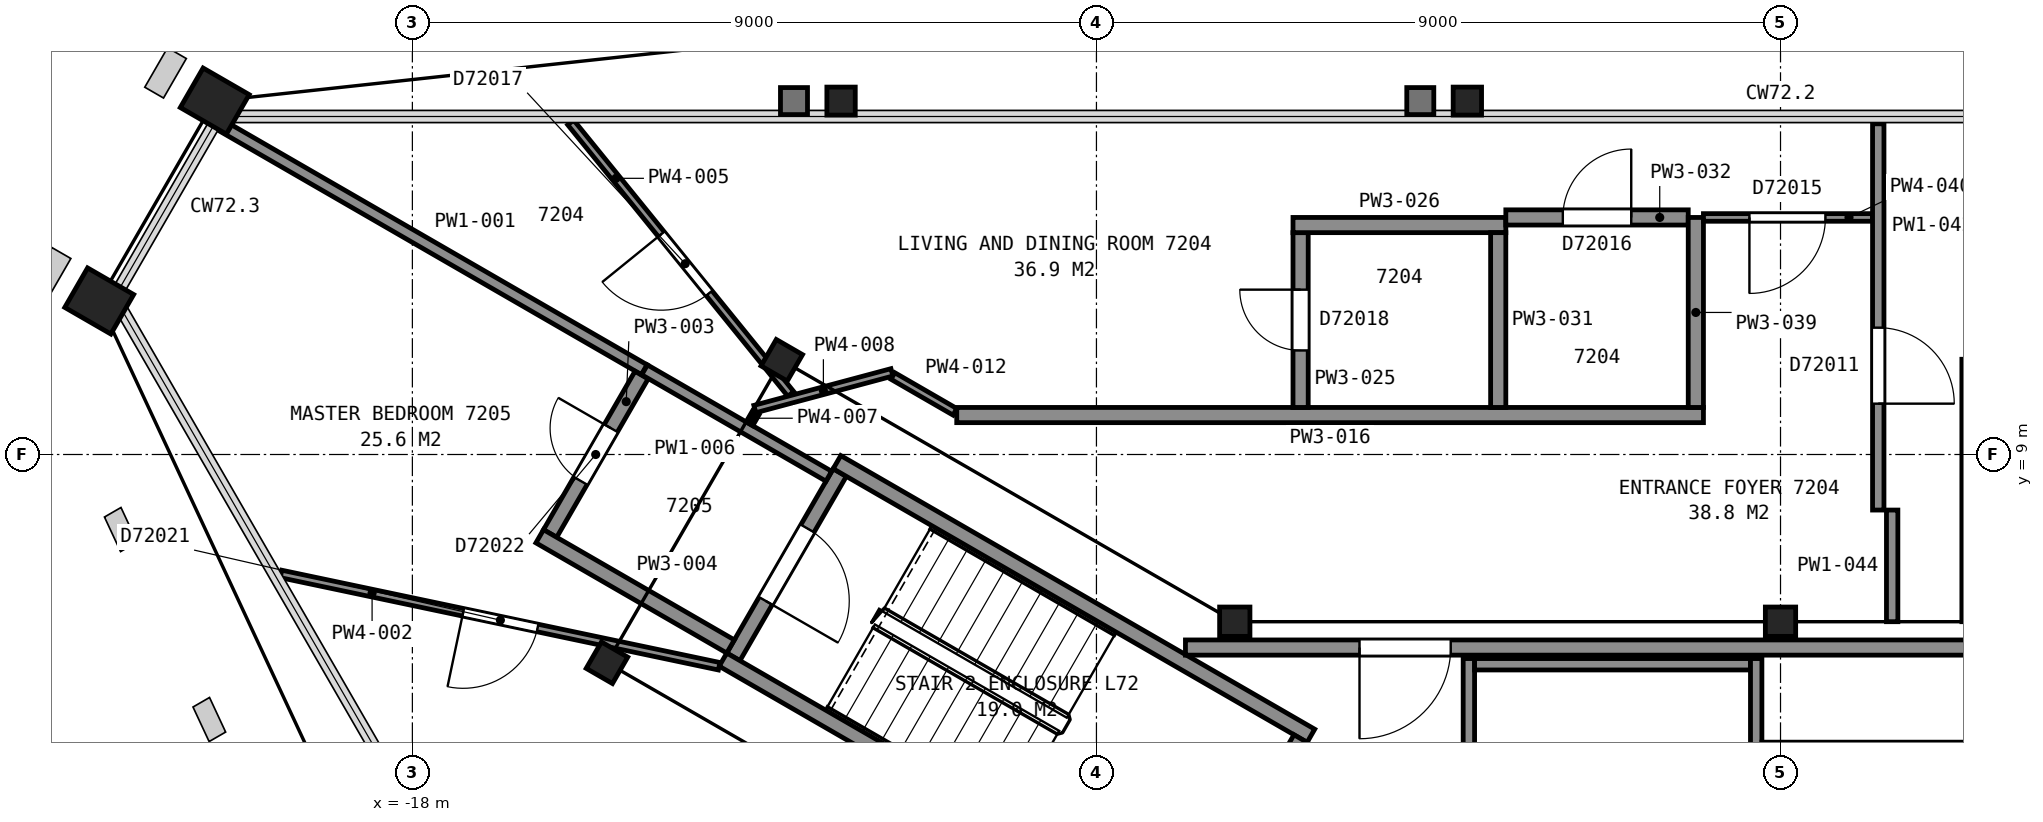
"""IFC4 building model, lengths in metres.
Left out: names, types, materials, properties, quantities, classifications, styles, units other than length and angle.
Written with IfcOpenShell. Run it as: python <this file> out.ifc"""

import sys

from ifc_helpers import new_model, si_unit, direction, frame, frame_2d, origin, origin_2d, place, context, subcontext, project, spatial, rectangle, hollow_rectangle, i_section, extrude, element, fill, save


model = new_model("IFC4")
c1 = context("Model", 3, precision=1e-05, world=origin(), true_north=direction((0.0, 1.0)))
c2 = subcontext(c1, "Body", "Model", "MODEL_VIEW")
j1 = project(units=[si_unit("LENGTHUNIT", "METRE"), si_unit("PLANEANGLEUNIT", "RADIAN")], contexts=[c1])
p1 = place(None, origin())
s1 = spatial("IfcSite", under=j1, at=p1, CompositionType="ELEMENT")
p2 = place(p1, origin())
s2 = spatial("IfcBuilding", under=s1, at=p2, CompositionType="ELEMENT")
p3 = place(p2, frame((0.0, 0.0, 286.2)))
s3 = spatial("IfcBuildingStorey", under=s2, at=p3, CompositionType="ELEMENT", Elevation=286.2)
for number, where, z_axis, x_axis in (
    (1, (-4.12, 13.65, 0.0), (0.0, 0.0, 1.0), (1.0, 0.0, 0.0)),
    (2, (-12.36, 13.65, 0.0), (0.0, 0.0, 1.0), (1.0, 0.0, 0.0)),
):
    element("IfcColumn", number, at=place(p3, frame(where, z_axis=z_axis, x_axis=x_axis)), inside=s3, PredefinedType="COLUMN", context=c2, shape_type="SweptSolid", body=[
        extrude(i_section(OverallWidth=0.373, OverallDepth=0.368, WebThickness=0.015, FlangeThickness=0.024, FilletRadius=0.015, at=origin_2d()), origin(), (0.0, 0.0, 1.0), 3.7),
    ])
for number, where, z_axis, x_axis in (
    (3, (-20.6, 13.65, 0.0), (0.0, 0.0, 1.0), (0.5, 0.866, 0.0)),
    (4, (-22.12, 11.02, 0.0), (0.0, 0.0, 1.0), (0.5, 0.866, 0.0)),
):
    element("IfcColumn", number, at=place(p3, frame(where, z_axis=z_axis, x_axis=x_axis)), inside=s3, PredefinedType="COLUMN", context=c2, shape_type="SweptSolid", body=[
        extrude(hollow_rectangle(XDim=0.6, YDim=0.7, WallThickness=0.04, at=origin_2d()), origin(), (0.0, 0.0, 1.0), 3.7),
    ])
for number, where, z_axis, x_axis in (
    (5, (0.0, 6.8, 0.0), (0.0, 0.0, 1.0), (1.0, 0.0, 0.0)),
    (6, (-7.18, 6.8, 0.0), (0.0, 0.0, 1.0), (1.0, 0.0, 0.0)),
):
    element("IfcColumn", number, at=place(p3, frame(where, z_axis=z_axis, x_axis=x_axis)), inside=s3, PredefinedType="COLUMN", context=c2, shape_type="SweptSolid", body=[
        extrude(i_section(OverallWidth=0.399, OverallDepth=0.386, WebThickness=0.021, FlangeThickness=0.033, FilletRadius=0.015, at=origin_2d()), origin(), (0.0, 0.0, 1.0), 3.7),
    ])
for number, where, z_axis, x_axis in (
    (7, (-13.14, 10.24, 0.0), (0.0, 0.0, 1.0), (0.5, 0.866, 0.0)),
    (8, (-15.44, 6.26, 0.0), (0.0, 0.0, 1.0), (0.5, 0.866, 0.0)),
):
    element("IfcColumn", number, at=place(p3, frame(where, z_axis=z_axis, x_axis=x_axis)), inside=s3, PredefinedType="COLUMN", context=c2, shape_type="SweptSolid", body=[
        extrude(i_section(OverallWidth=0.401, OverallDepth=0.399, WebThickness=0.025, FlangeThickness=0.04, FilletRadius=0.015, at=origin_2d()), origin(), (0.0, 0.0, 1.0), 3.7),
    ])
p4 = place(p3, frame((-12.377, 8.762, 0.0), z_axis=(0.0, 0.0, 1.0), x_axis=(-0.500049511043, -0.865996816683, 0.0)))
e9 = element("IfcWall", 9, at=p4, inside=s3, PredefinedType="PARTITIONING", context=c2, shape_type="SweptSolid", body=[
    extrude(rectangle(XDim=2.8, YDim=0.2, at=frame_2d((1.4, 0.0))), origin(), (0.0, 0.0, 1.0), 3.45),
])
p5 = place(p4, frame((0.85, 0.0, 0.0)))
e10 = element("IfcOpeningElement", 10, at=p5, cuts=e9, PredefinedType="OPENING", context=c2, shape_type="SweptSolid", body=[
    extrude(rectangle(XDim=1.1, YDim=2.1, at=frame_2d((0.55, 1.05))), frame((0.0, 0.11, 0.0), z_axis=(0.0, -1.0, 0.0), x_axis=(1.0, 0.0, 0.0)), (0.0, 0.0, 1.0), 0.22),
])
for number, where, z_axis, x_axis in (
    (11, (-7.678, 2.701, 0.0), (0.0, 0.0, 1.0), (-0.866, 0.5, 0.0)),
    (12, (-6.178, 5.299, 0.0), (0.0, 0.0, 1.0), (-0.866, 0.5, 0.0)),
):
    element("IfcWall", number, at=place(p3, frame(where, z_axis=z_axis, x_axis=x_axis)), inside=s3, PredefinedType="PARTITIONING", context=c2, shape_type="SweptSolid", body=[
        extrude(rectangle(XDim=7.2, YDim=0.2, at=frame_2d((3.6, 0.0))), origin(), (0.0, 0.0, 1.0), 3.45),
    ])
p6 = place(p3, frame((-6.315, 5.262, 0.0), z_axis=(0.0, 0.0, 1.0), x_axis=(-0.500049511043, -0.865996816683, 0.0)))
e13 = element("IfcWall", 13, at=p6, inside=s3, PredefinedType="PARTITIONING", context=c2, shape_type="SweptSolid", body=[
    extrude(rectangle(XDim=2.8, YDim=0.2, at=frame_2d((1.4, 0.0))), origin(), (0.0, 0.0, 1.0), 3.45),
])
p7 = place(p3, frame((7.829, 6.46, 0.0), z_axis=(0.0, 0.0, 1.0), x_axis=(-1.0, 0.0, 0.0)))
e14 = element("IfcWall", 14, at=p7, inside=s3, PredefinedType="PARTITIONING", context=c2, shape_type="SweptSolid", body=[
    extrude(rectangle(XDim=15.658, YDim=0.2, at=frame_2d((7.829, 0.0))), origin(), (0.0, 0.0, 1.0), 3.45),
])
p8 = place(p7, frame((12.168, 0.0, 0.0)))
e15 = element("IfcOpeningElement", 15, at=p8, cuts=e14, PredefinedType="OPENING", context=c2, shape_type="SweptSolid", body=[
    extrude(rectangle(XDim=1.2, YDim=2.1, at=frame_2d((0.6, 1.05))), frame((0.0, 0.11, 0.0), z_axis=(0.0, -1.0, 0.0), x_axis=(1.0, 0.0, 0.0)), (0.0, 0.0, 1.0), 0.22),
])
p9 = place(p3, frame((-4.1, 2.085, 0.0), z_axis=(0.0, 0.0, 1.0), x_axis=(0.0, 1.0, 0.0)))
e16 = element("IfcWall", 16, at=p9, inside=s3, PredefinedType="PARTITIONING", context=c2, shape_type="SweptSolid", body=[
    extrude(rectangle(XDim=4.23, YDim=0.15, at=frame_2d((2.115, 0.0))), origin(), (0.0, 0.0, 1.0), 3.45),
])
p10 = place(p9, frame((1.625, 0.0, 0.0)))
e17 = element("IfcOpeningElement", 17, at=p10, cuts=e16, PredefinedType="OPENING", context=c2, shape_type="SweptSolid", body=[
    extrude(rectangle(XDim=1.0, YDim=2.1, at=frame_2d((0.5, 1.05))), frame((0.0, 0.085, 0.0), z_axis=(0.0, -1.0, 0.0), x_axis=(1.0, 0.0, 0.0)), (0.0, 0.0, 1.0), 0.17),
])
p11 = place(p3, frame((-4.025, 6.24, 0.0), z_axis=(0.0, 0.0, 1.0), x_axis=(1.0, 0.0, 0.0)))
e18 = element("IfcWall", 18, at=p11, inside=s3, PredefinedType="PARTITIONING", context=c2, shape_type="SweptSolid", body=[
    extrude(rectangle(XDim=3.63, YDim=0.15, at=frame_2d((1.815, 0.0))), origin(), (0.0, 0.0, 1.0), 3.45),
])
p12 = place(p3, frame((-0.32, 2.252, 0.0), z_axis=(0.0, 0.0, 1.0), x_axis=(0.0, 1.0, 0.0)))
e19 = element("IfcWall", 19, at=p12, inside=s3, PredefinedType="PARTITIONING", context=c2, shape_type="SweptSolid", body=[
    extrude(rectangle(XDim=4.063, YDim=0.15, at=frame_2d((2.031, 0.0))), origin(), (0.0, 0.0, 1.0), 3.45),
])
p13 = place(p3, frame((-0.245, 5.14, 0.0), z_axis=(0.0, 0.0, 1.0), x_axis=(1.0, 0.0, 0.0)))
e20 = element("IfcWall", 20, at=p13, inside=s3, PredefinedType="PARTITIONING", context=c2, shape_type="SweptSolid", body=[
    extrude(rectangle(XDim=5.11, YDim=0.15, at=frame_2d((2.555, 0.0))), origin(), (0.0, 0.0, 1.0), 3.45),
])
p14 = place(p13, frame((1.975, 0.0, 0.0)))
e21 = element("IfcOpeningElement", 21, at=p14, cuts=e20, PredefinedType="OPENING", context=c2, shape_type="SweptSolid", body=[
    extrude(rectangle(XDim=1.0, YDim=2.1, at=frame_2d((0.5, 1.05))), frame((0.0, 0.085, 0.0), z_axis=(0.0, -1.0, 0.0), x_axis=(1.0, 0.0, 0.0)), (0.0, 0.0, 1.0), 0.17),
])
p15 = place(p3, frame((-20.506, 13.324, 0.0), z_axis=(0.0, 0.0, 1.0), x_axis=(0.866004971522, -0.500035388047, 0.0)))
e22 = element("IfcWall", 22, at=p15, inside=s3, PredefinedType="PARTITIONING", context=c2, shape_type="SweptSolid", body=[
    extrude(rectangle(XDim=6.416, YDim=0.15, at=frame_2d((3.208, 0.0))), origin(), (0.0, 0.0, 1.0), 2.723),
])
p16 = place(p3, frame((-19.729, 7.428, 0.0), z_axis=(0.0, 0.0, 1.0), x_axis=(0.97852427483, -0.206131617102, 0.0)))
e23 = element("IfcWall", 23, at=p16, inside=s3, PredefinedType="PARTITIONING", context=c2, shape_type="SweptSolid", body=[
    extrude(rectangle(XDim=5.891, YDim=0.1, at=frame_2d((2.946, 0.0))), origin(), (0.0, 0.0, 1.0), 2.723),
])
p17 = place(p16, frame((2.45, 0.0, 0.0)))
e24 = element("IfcOpeningElement", 24, at=p17, cuts=e23, PredefinedType="OPENING", context=c2, shape_type="SweptSolid", body=[
    extrude(rectangle(XDim=1.0, YDim=2.1, at=frame_2d((0.5, 1.05))), frame((0.0, 0.06, 0.0), z_axis=(0.0, -1.0, 0.0), x_axis=(1.0, 0.0, 0.0)), (0.0, 0.0, 1.0), 0.12),
])
p18 = place(p3, frame((-14.985, 10.045, 0.0), z_axis=(0.0, 0.0, 1.0), x_axis=(-0.499903970786, -0.866080839178, 0.0)))
e25 = element("IfcWall", 25, at=p18, inside=s3, PredefinedType="PARTITIONING", context=c2, shape_type="SweptSolid", body=[
    extrude(rectangle(XDim=2.406, YDim=0.2, at=frame_2d((1.203, 0.0))), origin(), (0.0, 0.0, 1.0), 2.723),
])
p19 = place(p18, frame((0.806, 0.0, 0.0)))
e26 = element("IfcOpeningElement", 26, at=p19, cuts=e25, PredefinedType="OPENING", context=c2, shape_type="SweptSolid", body=[
    extrude(rectangle(XDim=0.8, YDim=2.1, at=frame_2d((0.4, 1.05))), frame((0.0, 0.11, 0.0), z_axis=(0.0, -1.0, 0.0), x_axis=(1.0, 0.0, 0.0)), (0.0, 0.0, 1.0), 0.22),
])
p20 = place(p3, frame((-16.325, 7.924, 0.0), z_axis=(0.0, 0.0, 1.0), x_axis=(0.865969617579, -0.500096612097, 0.0)))
e27 = element("IfcWall", 27, at=p20, inside=s3, PredefinedType="PARTITIONING", context=c2, shape_type="SweptSolid", body=[
    extrude(rectangle(XDim=2.899, YDim=0.2, at=frame_2d((1.45, 0.0))), origin(), (0.0, 0.0, 1.0), 2.723),
])
p21 = place(p3, frame((-13.021, 9.797, 0.0), z_axis=(0.0, 0.0, 1.0), x_axis=(-0.629738754572, 0.776806990822, 0.0)))
e28 = element("IfcWall", 28, at=p21, inside=s3, PredefinedType="PARTITIONING", context=c2, shape_type="SweptSolid", body=[
    extrude(rectangle(XDim=4.598, YDim=0.1, at=frame_2d((2.299, 0.0))), origin(), (0.0, 0.0, 1.0), 2.723),
])
p22 = place(p21, frame((1.706, 0.0, 0.0)))
e29 = element("IfcOpeningElement", 29, at=p22, cuts=e28, PredefinedType="OPENING", context=c2, shape_type="SweptSolid", body=[
    extrude(rectangle(XDim=1.0, YDim=2.1, at=frame_2d((0.5, 1.05))), frame((0.0, 0.06, 0.0), z_axis=(0.0, -1.0, 0.0), x_axis=(1.0, 0.0, 0.0)), (0.0, 0.0, 1.0), 0.12),
])
p23 = place(p3, frame((-14.945, 10.114, 0.0), z_axis=(0.0, 0.0, 1.0), x_axis=(0.865969158485, -0.500097407065, 0.0)))
e30 = element("IfcWall", 30, at=p23, inside=s3, PredefinedType="PARTITIONING", context=c2, shape_type="SweptSolid", body=[
    extrude(rectangle(XDim=2.799, YDim=0.15, at=frame_2d((1.4, 0.0))), origin(), (0.0, 0.0, 1.0), 2.723),
])
p24 = place(p3, frame((-13.565, 9.404, 0.0), z_axis=(0.0, 0.0, 1.0), x_axis=(0.500181256421, 0.865920730047, 0.0)))
e31 = element("IfcWall", 31, at=p24, inside=s3, PredefinedType="PARTITIONING", context=c2, shape_type="SweptSolid", body=[
    extrude(rectangle(XDim=0.169, YDim=0.1, at=frame_2d((0.084, 0.0))), origin(), (0.0, 0.0, 1.0), 2.723),
])
p25 = place(p3, frame((-13.494, 9.598, 0.0), z_axis=(0.0, 0.0, 1.0), x_axis=(0.96601104623, 0.258500790254, 0.0)))
e32 = element("IfcWall", 32, at=p25, inside=s3, PredefinedType="PARTITIONING", context=c2, shape_type="SweptSolid", body=[
    extrude(rectangle(XDim=1.867, YDim=0.1, at=frame_2d((0.934, 0.0))), origin(), (0.0, 0.0, 1.0), 2.723),
])
p26 = place(p3, frame((-11.678, 10.033, 0.0), z_axis=(0.0, 0.0, 1.0), x_axis=(0.866116627388, -0.499841962787, 0.0)))
e33 = element("IfcWall", 33, at=p26, inside=s3, PredefinedType="PARTITIONING", context=c2, shape_type="SweptSolid", body=[
    extrude(rectangle(XDim=0.943, YDim=0.1, at=frame_2d((0.472, 0.0))), origin(), (0.0, 0.0, 1.0), 2.723),
])
p27 = place(p3, frame((-10.838, 9.519, 0.0), z_axis=(0.0, 0.0, 1.0), x_axis=(1.0, 0.0, 0.0)))
e34 = element("IfcWall", 34, at=p27, inside=s3, PredefinedType="PARTITIONING", context=c2, shape_type="SweptSolid", body=[
    extrude(rectangle(XDim=9.824, YDim=0.2, at=frame_2d((4.912, 0.0))), origin(), (0.0, 0.0, 1.0), 2.723),
])
p28 = place(p3, frame((-6.314, 11.919, 0.0), z_axis=(0.0, 0.0, 1.0), x_axis=(0.0, -1.0, 0.0)))
e35 = element("IfcWall", 35, at=p28, inside=s3, PredefinedType="PARTITIONING", context=c2, shape_type="SweptSolid", body=[
    extrude(rectangle(XDim=2.3, YDim=0.2, at=frame_2d((1.15, 0.0))), origin(), (0.0, 0.0, 1.0), 2.723),
])
p29 = place(p28, frame((0.75, 0.0, 0.0)))
e36 = element("IfcOpeningElement", 36, at=p29, cuts=e35, PredefinedType="OPENING", context=c2, shape_type="SweptSolid", body=[
    extrude(rectangle(XDim=0.8, YDim=2.1, at=frame_2d((0.4, 1.05))), frame((0.0, 0.11, 0.0), z_axis=(0.0, -1.0, 0.0), x_axis=(1.0, 0.0, 0.0)), (0.0, 0.0, 1.0), 0.22),
])
p30 = place(p3, frame((-6.414, 12.019, 0.0), z_axis=(0.0, 0.0, 1.0), x_axis=(1.0, 0.0, 0.0)))
e37 = element("IfcWall", 37, at=p30, inside=s3, PredefinedType="PARTITIONING", context=c2, shape_type="SweptSolid", body=[
    extrude(rectangle(XDim=2.8, YDim=0.2, at=frame_2d((1.4, 0.0))), origin(), (0.0, 0.0, 1.0), 2.723),
])
p31 = place(p3, frame((-3.714, 9.619, 0.0), z_axis=(0.0, 0.0, 1.0), x_axis=(0.0, 1.0, 0.0)))
e38 = element("IfcWall", 38, at=p31, inside=s3, PredefinedType="PARTITIONING", context=c2, shape_type="SweptSolid", body=[
    extrude(rectangle(XDim=2.3, YDim=0.2, at=frame_2d((1.15, 0.0))), origin(), (0.0, 0.0, 1.0), 2.723),
])
p32 = place(p3, frame((-1.214, 12.119, 0.0), z_axis=(0.0, 0.0, 1.0), x_axis=(-1.0, 0.0, 0.0)))
e39 = element("IfcWall", 39, at=p32, inside=s3, PredefinedType="PARTITIONING", context=c2, shape_type="SweptSolid", body=[
    extrude(rectangle(XDim=2.4, YDim=0.2, at=frame_2d((1.2, 0.0))), origin(), (0.0, 0.0, 1.0), 2.723),
])
p33 = place(p32, frame((0.75, 0.0, 0.0)))
e40 = element("IfcOpeningElement", 40, at=p33, cuts=e39, PredefinedType="OPENING", context=c2, shape_type="SweptSolid", body=[
    extrude(rectangle(XDim=0.9, YDim=2.1, at=frame_2d((0.45, 1.05))), frame((0.0, 0.11, 0.0), z_axis=(0.0, -1.0, 0.0), x_axis=(1.0, 0.0, 0.0)), (0.0, 0.0, 1.0), 0.22),
])
p34 = place(p3, frame((-1.114, 9.619, 0.0), z_axis=(0.0, 0.0, 1.0), x_axis=(0.0, 1.0, 0.0)))
e41 = element("IfcWall", 41, at=p34, inside=s3, PredefinedType="PARTITIONING", context=c2, shape_type="SweptSolid", body=[
    extrude(rectangle(XDim=2.5, YDim=0.2, at=frame_2d((1.25, 0.0))), origin(), (0.0, 0.0, 1.0), 2.723),
])
p35 = place(p3, frame((-1.014, 12.119, 0.0), z_axis=(0.0, 0.0, 1.0), x_axis=(1.0, 0.0, 0.0)))
e42 = element("IfcWall", 42, at=p35, inside=s3, PredefinedType="PARTITIONING", context=c2, shape_type="SweptSolid", body=[
    extrude(rectangle(XDim=2.225, YDim=0.1, at=frame_2d((1.112, 0.0))), origin(), (0.0, 0.0, 1.0), 2.723),
])
p36 = place(p35, frame((0.605, 0.0, 0.0)))
e43 = element("IfcOpeningElement", 43, at=p36, cuts=e42, PredefinedType="OPENING", context=c2, shape_type="SweptSolid", body=[
    extrude(rectangle(XDim=1.0, YDim=2.1, at=frame_2d((0.5, 1.05))), frame((0.0, 0.06, 0.0), z_axis=(0.0, -1.0, 0.0), x_axis=(1.0, 0.0, 0.0)), (0.0, 0.0, 1.0), 0.12),
])
p37 = place(p3, frame((1.286, 13.351, 0.0), z_axis=(0.0, 0.0, 1.0), x_axis=(0.0, -1.0, 0.0)))
e44 = element("IfcWall", 44, at=p37, inside=s3, PredefinedType="PARTITIONING", context=c2, shape_type="SweptSolid", body=[
    extrude(rectangle(XDim=5.082, YDim=0.15, at=frame_2d((2.541, 0.0))), origin(), (0.0, 0.0, 1.0), 2.723),
])
p38 = place(p37, frame((2.682, 0.0, 0.0)))
e45 = element("IfcOpeningElement", 45, at=p38, cuts=e44, PredefinedType="OPENING", context=c2, shape_type="SweptSolid", body=[
    extrude(rectangle(XDim=1.0, YDim=2.1, at=frame_2d((0.5, 1.05))), frame((0.0, 0.085, 0.0), z_axis=(0.0, -1.0, 0.0), x_axis=(1.0, 0.0, 0.0)), (0.0, 0.0, 1.0), 0.17),
])
p39 = place(p3, frame((1.469, 6.8, 0.0), z_axis=(0.0, 0.0, 1.0), x_axis=(0.0, 1.0, 0.0)))
e46 = element("IfcWall", 46, at=p39, inside=s3, PredefinedType="PARTITIONING", context=c2, shape_type="SweptSolid", body=[
    extrude(rectangle(XDim=1.469, YDim=0.15, at=frame_2d((0.734, 0.0))), origin(), (0.0, 0.0, 1.0), 2.723),
])
p40 = place(p3, frame((2.486, 6.8, 0.0), z_axis=(0.0, 0.0, 1.0), x_axis=(0.0, 1.0, 0.0)))
e47 = element("IfcWall", 47, at=p40, inside=s3, PredefinedType="PARTITIONING", context=c2, shape_type="SweptSolid", body=[
    extrude(rectangle(XDim=3.453, YDim=0.2, at=frame_2d((1.727, 0.0))), origin(), (0.0, 0.0, 1.0), 2.723),
])
p41 = place(p5, origin())
e48 = element("IfcDoor", 48, at=p41, inside=s3, OperationType="SINGLE_SWING_RIGHT", PredefinedType="DOOR", context=c2, shape_type="SweptSolid", body=[
    extrude(rectangle(XDim=1.1, YDim=2.1, at=frame_2d((0.55, 1.05))), frame((0.0, 0.025, 0.0), z_axis=(0.0, -1.0, 0.0), x_axis=(1.0, 0.0, 0.0)), (0.0, 0.0, 1.0), 0.05),
])
fill(e10, e48)
p42 = place(p8, origin())
e49 = element("IfcDoor", 49, at=p42, inside=s3, OperationType="SINGLE_SWING_RIGHT", PredefinedType="DOOR", context=c2, shape_type="SweptSolid", body=[
    extrude(rectangle(XDim=1.2, YDim=2.1, at=frame_2d((0.6, 1.05))), frame((0.0, 0.025, 0.0), z_axis=(0.0, -1.0, 0.0), x_axis=(1.0, 0.0, 0.0)), (0.0, 0.0, 1.0), 0.05),
])
fill(e15, e49)
p43 = place(p17, origin())
e50 = element("IfcDoor", 50, at=p43, inside=s3, OperationType="SINGLE_SWING_LEFT", PredefinedType="DOOR", context=c2, shape_type="SweptSolid", body=[
    extrude(rectangle(XDim=1.0, YDim=2.1, at=frame_2d((0.5, 1.05))), frame((0.0, 0.025, 0.0), z_axis=(0.0, -1.0, 0.0), x_axis=(1.0, 0.0, 0.0)), (0.0, 0.0, 1.0), 0.05),
])
fill(e24, e50)
p44 = place(p19, origin())
e51 = element("IfcDoor", 51, at=p44, inside=s3, OperationType="SINGLE_SWING_LEFT", PredefinedType="DOOR", context=c2, shape_type="SweptSolid", body=[
    extrude(rectangle(XDim=0.8, YDim=2.1, at=frame_2d((0.4, 1.05))), frame((0.0, 0.025, 0.0), z_axis=(0.0, -1.0, 0.0), x_axis=(1.0, 0.0, 0.0)), (0.0, 0.0, 1.0), 0.05),
])
fill(e26, e51)
p45 = place(p22, origin())
e52 = element("IfcDoor", 52, at=p45, inside=s3, OperationType="SINGLE_SWING_RIGHT", PredefinedType="DOOR", context=c2, shape_type="SweptSolid", body=[
    extrude(rectangle(XDim=1.0, YDim=2.1, at=frame_2d((0.5, 1.05))), frame((0.0, 0.025, 0.0), z_axis=(0.0, -1.0, 0.0), x_axis=(1.0, 0.0, 0.0)), (0.0, 0.0, 1.0), 0.05),
])
fill(e29, e52)
p46 = place(p29, origin())
e53 = element("IfcDoor", 53, at=p46, inside=s3, OperationType="SINGLE_SWING_LEFT", PredefinedType="DOOR", context=c2, shape_type="SweptSolid", body=[
    extrude(rectangle(XDim=0.8, YDim=2.1, at=frame_2d((0.4, 1.05))), frame((0.0, 0.025, 0.0), z_axis=(0.0, -1.0, 0.0), x_axis=(1.0, 0.0, 0.0)), (0.0, 0.0, 1.0), 0.05),
])
fill(e36, e53)
p47 = place(p33, origin())
e54 = element("IfcDoor", 54, at=p47, inside=s3, OperationType="SINGLE_SWING_LEFT", PredefinedType="DOOR", context=c2, shape_type="SweptSolid", body=[
    extrude(rectangle(XDim=0.9, YDim=2.1, at=frame_2d((0.45, 1.05))), frame((0.0, 0.025, 0.0), z_axis=(0.0, -1.0, 0.0), x_axis=(1.0, 0.0, 0.0)), (0.0, 0.0, 1.0), 0.05),
])
fill(e40, e54)
p48 = place(p36, origin())
e55 = element("IfcDoor", 55, at=p48, inside=s3, OperationType="SINGLE_SWING_LEFT", PredefinedType="DOOR", context=c2, shape_type="SweptSolid", body=[
    extrude(rectangle(XDim=1.0, YDim=2.1, at=frame_2d((0.5, 1.05))), frame((0.0, 0.025, 0.0), z_axis=(0.0, -1.0, 0.0), x_axis=(1.0, 0.0, 0.0)), (0.0, 0.0, 1.0), 0.05),
])
fill(e43, e55)
p49 = place(p38, origin())
e56 = element("IfcDoor", 56, at=p49, inside=s3, OperationType="SINGLE_SWING_RIGHT", PredefinedType="DOOR", context=c2, shape_type="SweptSolid", body=[
    extrude(rectangle(XDim=1.0, YDim=2.1, at=frame_2d((0.5, 1.05))), frame((0.0, 0.025, 0.0), z_axis=(0.0, -1.0, 0.0), x_axis=(1.0, 0.0, 0.0)), (0.0, 0.0, 1.0), 0.05),
])
fill(e45, e56)
save(model, sys.argv[1])
